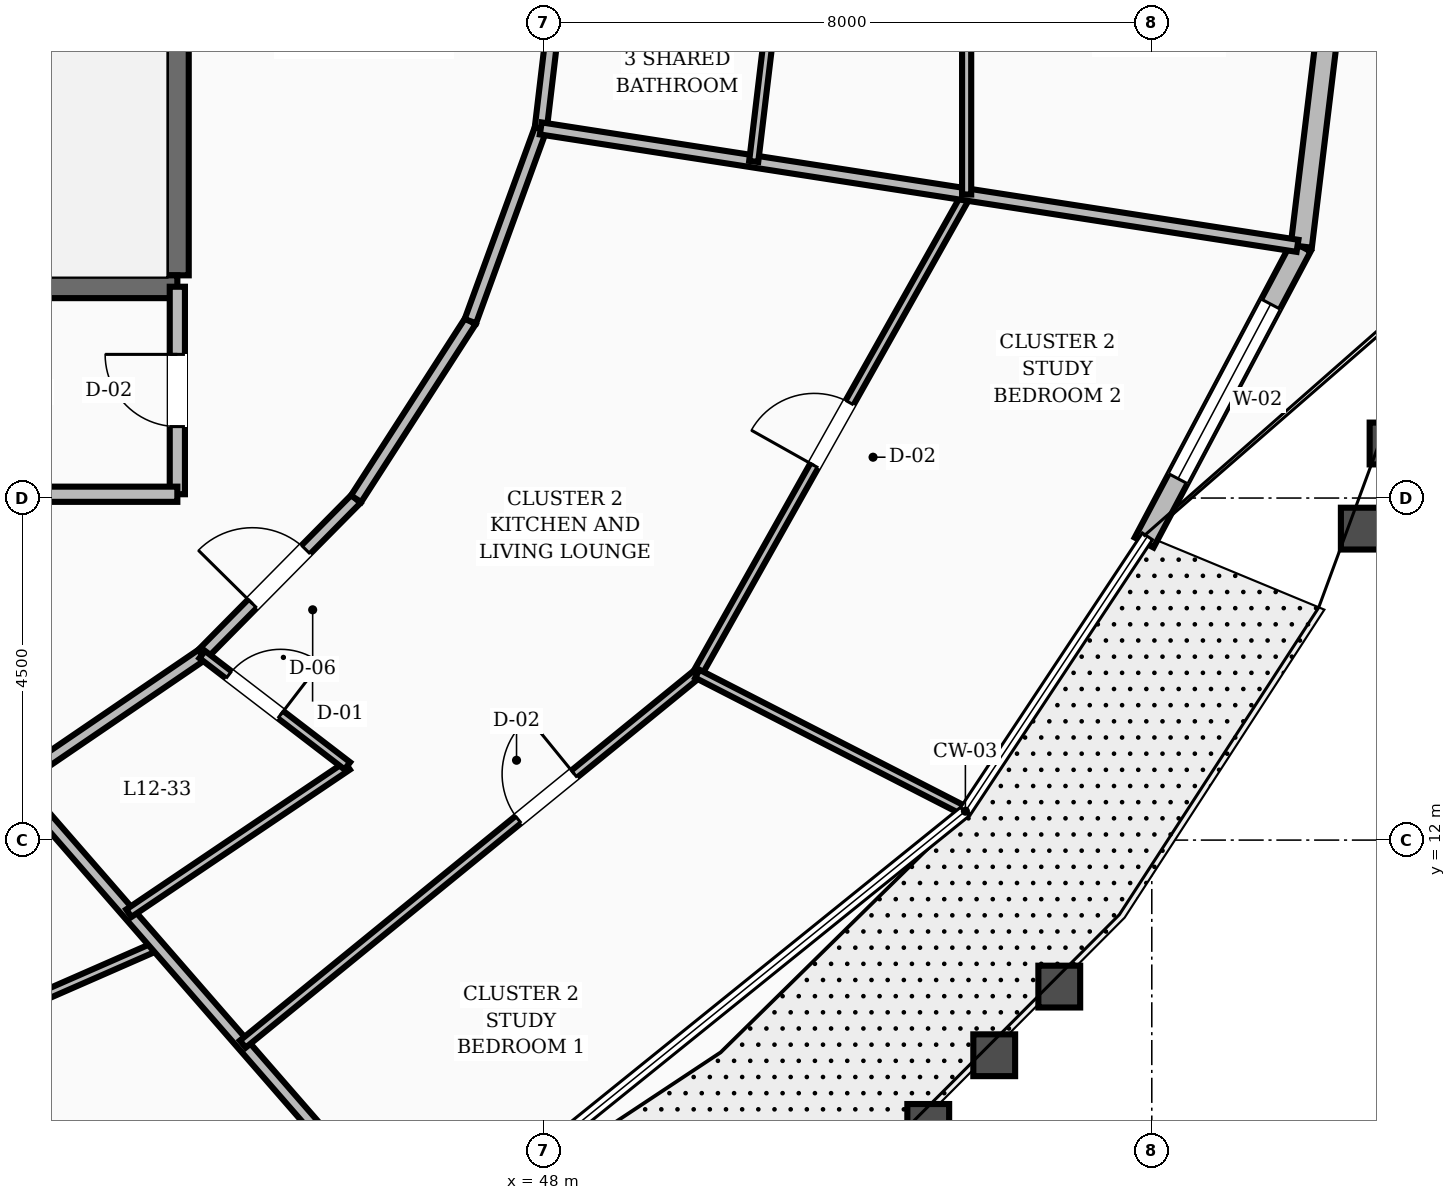
"""IFC4 building model, lengths in metres.
Left out: names, types, materials, properties, quantities, classifications, styles, units other than length and angle.
Written with IfcOpenShell. Run it as: python <this file> out.ifc"""

import sys

from ifc_helpers import new_model, si_unit, direction, frame, frame_2d, origin, place, context, subcontext, project, spatial, rectangle, extrude, element, fill, save


model = new_model("IFC4")
c1 = context("Model", 3, precision=1e-05, world=origin(), true_north=direction((0.0, 1.0)))
c2 = subcontext(c1, "Body", "Model", "MODEL_VIEW")
j1 = project(units=[si_unit("LENGTHUNIT", "METRE"), si_unit("PLANEANGLEUNIT", "RADIAN")], contexts=[c1])
p1 = place(None, origin())
s1 = spatial("IfcSite", under=j1, at=p1, CompositionType="ELEMENT")
p2 = place(p1, origin())
s2 = spatial("IfcBuilding", under=s1, at=p2, CompositionType="ELEMENT")
p3 = place(p2, frame((0.0, 0.0, 52.0)))
s3 = spatial("IfcBuildingStorey", under=s2, at=p3, CompositionType="ELEMENT", Elevation=52.0)
p4 = place(p3, frame((43.18, 19.43, 0.0), z_axis=(0.0, 0.0, 1.0), x_axis=(0.0, 1.0, 0.0)))
e1 = element("IfcWall", 1, at=p4, inside=s3, PredefinedType="SHEAR", context=c2, shape_type="SweptSolid", body=[
    extrude(rectangle(XDim=8.74, YDim=0.3, at=frame_2d((4.37, 0.0))), origin(), (0.0, 0.0, 1.0), 3.6),
])
p5 = place(p3, frame((39.58, 19.28, 0.0), z_axis=(0.0, 0.0, 1.0), x_axis=(1.0, 0.0, 0.0)))
e2 = element("IfcWall", 2, at=p5, inside=s3, PredefinedType="SHEAR", context=c2, shape_type="SweptSolid", body=[
    extrude(rectangle(XDim=3.6, YDim=0.3, at=frame_2d((1.8, 0.0))), origin(), (0.0, 0.0, 1.0), 3.6),
])
p6 = place(p3, frame((55.899, 15.915, 0.0), z_axis=(0.0, 0.0, 1.0), x_axis=(0.46873960988, 0.883336390131, 0.0)))
e3 = element("IfcWall", 3, at=p6, inside=s3, PredefinedType="STANDARD", context=c2, shape_type="SweptSolid", body=[
    extrude(rectangle(XDim=4.41, YDim=0.28, at=frame_2d((2.205, 0.0))), origin(), (0.0, 0.0, 1.0), 2.65),
])
p7 = place(p6, frame((0.951, 0.0, 0.8)))
e4 = element("IfcOpeningElement", 4, at=p7, cuts=e3, PredefinedType="OPENING", context=c2, shape_type="SweptSolid", body=[
    extrude(rectangle(XDim=2.6, YDim=1.65, at=frame_2d((1.3, 0.825))), frame((0.0, 0.15, 0.0), z_axis=(0.0, -1.0, 0.0), x_axis=(1.0, 0.0, 0.0)), (0.0, 0.0, 1.0), 0.3),
])
p8 = place(p3, frame((57.967, 19.81, 0.0), z_axis=(0.0, 0.0, 1.0), x_axis=(0.120495484084, 0.992713875352, 0.0)))
e5 = element("IfcWall", 5, at=p8, inside=s3, PredefinedType="STANDARD", context=c2, shape_type="SweptSolid", body=[
    extrude(rectangle(XDim=4.22, YDim=0.28, at=frame_2d((2.11, 0.0))), origin(), (0.0, 0.0, 1.0), 2.65),
])
p9 = place(p3, frame((43.18, 16.55, 0.0), z_axis=(0.0, 0.0, 1.0), x_axis=(0.0, 1.0, 0.0)))
e6 = element("IfcWall", 6, at=p9, inside=s3, PredefinedType="SOLIDWALL", context=c2, shape_type="SweptSolid", body=[
    extrude(rectangle(XDim=2.73, YDim=0.2, at=frame_2d((1.365, 0.0))), origin(), (0.0, 0.0, 1.0), 2.61),
])
p10 = place(p9, frame((0.89, 0.0, 0.0)))
e7 = element("IfcOpeningElement", 7, at=p10, cuts=e6, PredefinedType="OPENING", context=c2, shape_type="SweptSolid", body=[
    extrude(rectangle(XDim=0.95, YDim=2.1, at=frame_2d((0.475, 1.05))), frame((0.0, 0.11, 0.0), z_axis=(0.0, -1.0, 0.0), x_axis=(1.0, 0.0, 0.0)), (0.0, 0.0, 1.0), 0.22),
])
p11 = place(p3, frame((39.2, 16.55, 0.0), z_axis=(0.0, 0.0, 1.0), x_axis=(1.0, 0.0, 0.0)))
e8 = element("IfcWall", 8, at=p11, inside=s3, PredefinedType="SOLIDWALL", context=c2, shape_type="SweptSolid", body=[
    extrude(rectangle(XDim=3.98, YDim=0.2, at=frame_2d((1.99, 0.0))), origin(), (0.0, 0.0, 1.0), 2.61),
])
p12 = place(p3, frame((41.041, 12.76, 0.0), z_axis=(0.0, 0.0, 1.0), x_axis=(0.826293096206, 0.56324037423, 0.0)))
e9 = element("IfcWall", 9, at=p12, inside=s3, PredefinedType="SOLIDWALL", context=c2, shape_type="SweptSolid", body=[
    extrude(rectangle(XDim=2.985, YDim=0.16, at=frame_2d((1.492, 0.0))), origin(), (0.0, 0.0, 1.0), 2.61),
])
p13 = place(p3, frame((43.508, 14.441, 0.0), z_axis=(0.0, 0.0, 1.0), x_axis=(0.702811997, 0.711375636969, 0.0)))
e10 = element("IfcWall", 10, at=p13, inside=s3, PredefinedType="SOLIDWALL", context=c2, shape_type="SweptSolid", body=[
    extrude(rectangle(XDim=2.879, YDim=0.16, at=frame_2d((1.44, 0.0))), origin(), (0.0, 0.0, 1.0), 2.61),
])
p14 = place(p13, frame((0.94, 0.0, 0.0)))
e11 = element("IfcOpeningElement", 11, at=p14, cuts=e10, PredefinedType="OPENING", context=c2, shape_type="SweptSolid", body=[
    extrude(rectangle(XDim=1.0, YDim=2.1, at=frame_2d((0.5, 1.05))), frame((0.0, 0.09, 0.0), z_axis=(0.0, -1.0, 0.0), x_axis=(1.0, 0.0, 0.0)), (0.0, 0.0, 1.0), 0.18),
])
p15 = place(p3, frame((45.531, 16.49, 0.0), z_axis=(0.0, 0.0, 1.0), x_axis=(0.541126045017, 0.840941498206, 0.0)))
e12 = element("IfcWall", 12, at=p15, inside=s3, PredefinedType="SOLIDWALL", context=c2, shape_type="SweptSolid", body=[
    extrude(rectangle(XDim=2.779, YDim=0.16, at=frame_2d((1.39, 0.0))), origin(), (0.0, 0.0, 1.0), 2.61),
])
p16 = place(p3, frame((47.035, 18.827, 0.0), z_axis=(0.0, 0.0, 1.0), x_axis=(0.343013437329, 0.939330496583, 0.0)))
e13 = element("IfcWall", 13, at=p16, inside=s3, PredefinedType="SOLIDWALL", context=c2, shape_type="SweptSolid", body=[
    extrude(rectangle(XDim=2.7, YDim=0.16, at=frame_2d((1.35, 0.0))), origin(), (0.0, 0.0, 1.0), 2.61),
])
p17 = place(p3, frame((47.961, 21.363, 0.0), z_axis=(0.0, 0.0, 1.0), x_axis=(0.117763961213, 0.99304161516, 0.0)))
e14 = element("IfcWall", 14, at=p17, inside=s3, PredefinedType="SOLIDWALL", context=c2, shape_type="SweptSolid", body=[
    extrude(rectangle(XDim=2.656, YDim=0.16, at=frame_2d((1.328, 0.0))), origin(), (0.0, 0.0, 1.0), 2.61),
])
p18 = place(p3, frame((39.519, 9.119, 0.0), z_axis=(0.0, 0.0, 1.0), x_axis=(0.91594871557, 0.401295340672, 0.0)))
e15 = element("IfcWall", 15, at=p18, inside=s3, PredefinedType="PARTITIONING", context=c2, shape_type="SweptSolid", body=[
    extrude(rectangle(XDim=3.709, YDim=0.12, at=frame_2d((1.854, 0.0))), origin(), (0.0, 0.0, 1.0), 2.61),
])
p19 = place(p3, frame((41.041, 12.76, 0.0), z_axis=(0.0, 0.0, 1.0), x_axis=(0.656743729698, -0.754113833252, 0.0)))
e16 = element("IfcWall", 16, at=p19, inside=s3, PredefinedType="SOLIDWALL", context=c2, shape_type="SweptSolid", body=[
    extrude(rectangle(XDim=8.106, YDim=0.16, at=frame_2d((4.053, 0.0))), origin(), (0.0, 0.0, 1.0), 2.61),
])
p20 = place(p3, frame((42.541, 11.038, 0.0), z_axis=(0.0, 0.0, 1.0), x_axis=(0.829125253788, 0.559062888709, 0.0)))
e17 = element("IfcWall", 17, at=p20, inside=s3, PredefinedType="PARTITIONING", context=c2, shape_type="SweptSolid", body=[
    extrude(rectangle(XDim=3.468, YDim=0.12, at=frame_2d((1.734, 0.0))), origin(), (0.0, 0.0, 1.0), 2.61),
])
p21 = place(p3, frame((43.508, 14.441, 0.0), z_axis=(0.0, 0.0, 1.0), x_axis=(0.793351497124, -0.608763831063, 0.0)))
e18 = element("IfcWall", 18, at=p21, inside=s3, PredefinedType="PARTITIONING", context=c2, shape_type="SweptSolid", body=[
    extrude(rectangle(XDim=2.406, YDim=0.12, at=frame_2d((1.203, 0.0))), origin(), (0.0, 0.0, 1.0), 2.61),
])
p22 = place(p21, frame((0.44, 0.0, 0.0)))
e19 = element("IfcOpeningElement", 19, at=p22, cuts=e18, PredefinedType="OPENING", context=c2, shape_type="SweptSolid", body=[
    extrude(rectangle(XDim=0.86, YDim=2.1, at=frame_2d((0.43, 1.05))), frame((0.0, 0.07, 0.0), z_axis=(0.0, -1.0, 0.0), x_axis=(1.0, 0.0, 0.0)), (0.0, 0.0, 1.0), 0.14),
])
p23 = place(p3, frame((44.041, 9.316, 0.0), z_axis=(0.0, 0.0, 1.0), x_axis=(0.775210874422, 0.631702540899, 0.0)))
e20 = element("IfcWall", 20, at=p23, inside=s3, PredefinedType="PARTITIONING", context=c2, shape_type="SweptSolid", body=[
    extrude(rectangle(XDim=7.713, YDim=0.12, at=frame_2d((3.857, 0.0))), origin(), (0.0, 0.0, 1.0), 2.61),
])
p24 = place(p23, frame((4.676, 0.0, 0.0)))
e21 = element("IfcOpeningElement", 21, at=p24, cuts=e20, PredefinedType="OPENING", context=c2, shape_type="SweptSolid", body=[
    extrude(rectangle(XDim=0.95, YDim=2.1, at=frame_2d((0.475, 1.05))), frame((0.0, 0.07, 0.0), z_axis=(0.0, -1.0, 0.0), x_axis=(1.0, 0.0, 0.0)), (0.0, 0.0, 1.0), 0.14),
])
p25 = place(p3, frame((50.021, 14.188, 0.0), z_axis=(0.0, 0.0, 1.0), x_axis=(0.489964721586, 0.87174226214, 0.0)))
e22 = element("IfcWall", 22, at=p25, inside=s3, PredefinedType="PARTITIONING", context=c2, shape_type="SweptSolid", body=[
    extrude(rectangle(XDim=7.233, YDim=0.12, at=frame_2d((3.616, 0.0))), origin(), (0.0, 0.0, 1.0), 2.61),
])
p26 = place(p25, frame((3.141, 0.0, 0.0)))
e23 = element("IfcOpeningElement", 23, at=p26, cuts=e22, PredefinedType="OPENING", context=c2, shape_type="SweptSolid", body=[
    extrude(rectangle(XDim=0.95, YDim=2.1, at=frame_2d((0.475, 1.05))), frame((0.0, 0.07, 0.0), z_axis=(0.0, -1.0, 0.0), x_axis=(1.0, 0.0, 0.0)), (0.0, 0.0, 1.0), 0.14),
])
p27 = place(p3, frame((50.021, 14.188, 0.0), z_axis=(0.0, 0.0, 1.0), x_axis=(0.889852530741, -0.456248258664, 0.0)))
e24 = element("IfcWall", 24, at=p27, inside=s3, PredefinedType="PARTITIONING", context=c2, shape_type="SweptSolid", body=[
    extrude(rectangle(XDim=3.914, YDim=0.12, at=frame_2d((1.957, 0.0))), origin(), (0.0, 0.0, 1.0), 2.61),
])
p28 = place(p3, frame((47.961, 21.363, 0.0), z_axis=(0.0, 0.0, 1.0), x_axis=(0.988176752001, -0.153318970792, 0.0)))
e25 = element("IfcWall", 25, at=p28, inside=s3, PredefinedType="SOLIDWALL", context=c2, shape_type="SweptSolid", body=[
    extrude(rectangle(XDim=10.075, YDim=0.16, at=frame_2d((5.038, 0.0))), origin(), (0.0, 0.0, 1.0), 2.61),
])
p29 = place(p3, frame((50.763, 20.928, 0.0), z_axis=(0.0, 0.0, 1.0), x_axis=(0.118837170514, 0.992913756025, 0.0)))
e26 = element("IfcWall", 26, at=p29, inside=s3, PredefinedType="PARTITIONING", context=c2, shape_type="SweptSolid", body=[
    extrude(rectangle(XDim=3.094, YDim=0.12, at=frame_2d((1.547, 0.0))), origin(), (0.0, 0.0, 1.0), 2.61),
])
p30 = place(p3, frame((53.564, 20.493, 0.0), z_axis=(0.0, 0.0, 1.0), x_axis=(0.0, 1.0, 0.0)))
e27 = element("IfcWall", 27, at=p30, inside=s3, PredefinedType="PARTITIONING", context=c2, shape_type="SweptSolid", body=[
    extrude(rectangle(XDim=7.013, YDim=0.12, at=frame_2d((3.507, 0.0))), origin(), (0.0, 0.0, 1.0), 2.61),
])
p31 = place(p30, frame((4.172, 0.0, 0.0)))
e28 = element("IfcOpeningElement", 28, at=p31, cuts=e27, PredefinedType="OPENING", context=c2, shape_type="SweptSolid", body=[
    extrude(rectangle(XDim=0.95, YDim=2.1, at=frame_2d((0.475, 1.05))), frame((0.0, 0.07, 0.0), z_axis=(0.0, -1.0, 0.0), x_axis=(1.0, 0.0, 0.0)), (0.0, 0.0, 1.0), 0.14),
])
p32 = place(p7, origin())
e29 = element("IfcWindow", 29, at=p32, inside=s3, PartitioningType="SINGLE_PANEL", PredefinedType="WINDOW", context=c2, shape_type="SweptSolid", body=[
    extrude(rectangle(XDim=2.6, YDim=1.65, at=frame_2d((1.3, 0.825))), frame((0.0, 0.03, 0.0), z_axis=(0.0, -1.0, 0.0), x_axis=(1.0, 0.0, 0.0)), (0.0, 0.0, 1.0), 0.06),
])
fill(e4, e29)
p33 = place(p10, origin())
e30 = element("IfcDoor", 30, at=p33, inside=s3, OperationType="SINGLE_SWING_RIGHT", PredefinedType="DOOR", context=c2, shape_type="SweptSolid", body=[
    extrude(rectangle(XDim=0.95, YDim=2.1, at=frame_2d((0.475, 1.05))), frame((0.0, 0.025, 0.0), z_axis=(0.0, -1.0, 0.0), x_axis=(1.0, 0.0, 0.0)), (0.0, 0.0, 1.0), 0.05),
])
fill(e7, e30)
p34 = place(p22, origin())
e31 = element("IfcDoor", 31, at=p34, inside=s3, OperationType="SINGLE_SWING_RIGHT", PredefinedType="DOOR", context=c2, shape_type="SweptSolid", body=[
    extrude(rectangle(XDim=0.86, YDim=2.1, at=frame_2d((0.43, 1.05))), frame((0.0, 0.025, 0.0), z_axis=(0.0, -1.0, 0.0), x_axis=(1.0, 0.0, 0.0)), (0.0, 0.0, 1.0), 0.05),
])
fill(e19, e31)
p35 = place(p14, origin())
e32 = element("IfcDoor", 32, at=p35, inside=s3, OperationType="SINGLE_SWING_LEFT", PredefinedType="DOOR", context=c2, shape_type="SweptSolid", body=[
    extrude(rectangle(XDim=1.0, YDim=2.1, at=frame_2d((0.5, 1.05))), frame((0.0, 0.025, 0.0), z_axis=(0.0, -1.0, 0.0), x_axis=(1.0, 0.0, 0.0)), (0.0, 0.0, 1.0), 0.05),
])
fill(e11, e32)
p36 = place(p24, origin())
e33 = element("IfcDoor", 33, at=p36, inside=s3, OperationType="SINGLE_SWING_RIGHT", PredefinedType="DOOR", context=c2, shape_type="SweptSolid", body=[
    extrude(rectangle(XDim=0.95, YDim=2.1, at=frame_2d((0.475, 1.05))), frame((0.0, 0.025, 0.0), z_axis=(0.0, -1.0, 0.0), x_axis=(1.0, 0.0, 0.0)), (0.0, 0.0, 1.0), 0.05),
])
fill(e21, e33)
p37 = place(p26, origin())
e34 = element("IfcDoor", 34, at=p37, inside=s3, OperationType="SINGLE_SWING_LEFT", PredefinedType="DOOR", context=c2, shape_type="SweptSolid", body=[
    extrude(rectangle(XDim=0.95, YDim=2.1, at=frame_2d((0.475, 1.05))), frame((0.0, 0.025, 0.0), z_axis=(0.0, -1.0, 0.0), x_axis=(1.0, 0.0, 0.0)), (0.0, 0.0, 1.0), 0.05),
])
fill(e23, e34)
save(model, sys.argv[1])
